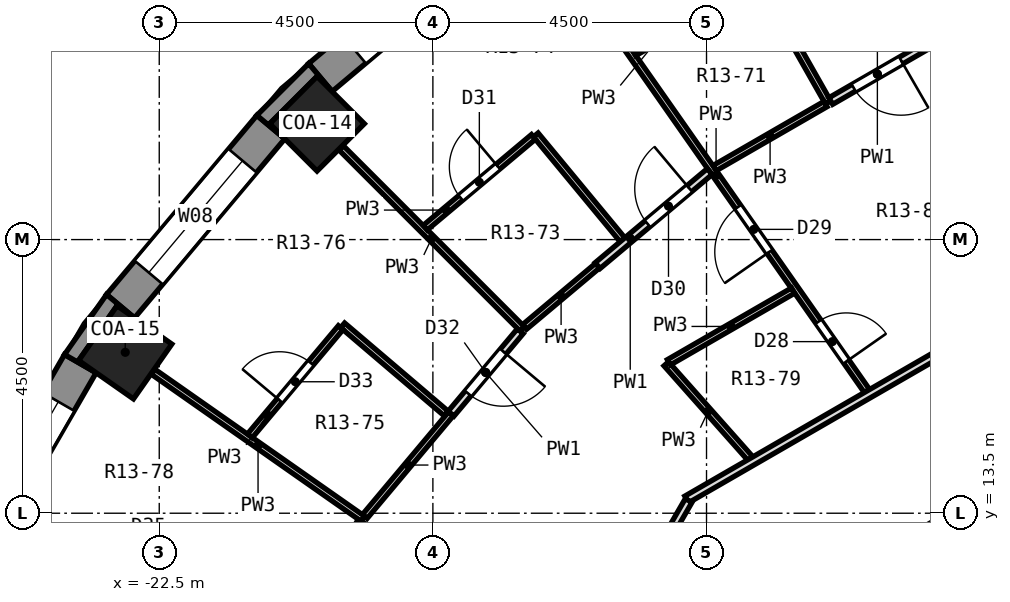
"""IFC4 building model, lengths in metres.
Left out: names, types, materials, properties, quantities, classifications, styles, units other than length and angle.
Written with IfcOpenShell. Run it as: python <this file> out.ifc"""

import sys

from ifc_helpers import new_model, si_unit, direction, frame, frame_2d, origin, origin_2d, place, context, subcontext, project, spatial, polyline, rectangle, outline, extrude, element, fill, save


model = new_model("IFC4")
c1 = context("Model", 3, precision=1e-05, world=origin(), true_north=direction((0.0, 1.0)))
c2 = subcontext(c1, "Body", "Model", "MODEL_VIEW")
j1 = project(units=[si_unit("LENGTHUNIT", "METRE"), si_unit("PLANEANGLEUNIT", "RADIAN")], contexts=[c1])
p1 = place(None, origin())
s1 = spatial("IfcSite", under=j1, at=p1, CompositionType="ELEMENT")
p2 = place(p1, origin())
s2 = spatial("IfcBuilding", under=s1, at=p2, CompositionType="ELEMENT")
p3 = place(p2, frame((0.0, 0.0, 65.9)))
s3 = spatial("IfcBuildingStorey", under=s2, at=p3, CompositionType="ELEMENT", Elevation=65.9)
for number, where, z_axis, x_axis in (
    (1, (-19.905, 19.905, 0.0), (0.0, 0.0, 1.0), (-0.707, 0.707, 0.0)),
    (2, (-23.059, 16.146, 0.0), (0.0, 0.0, 1.0), (-0.819, 0.574, 0.0)),
):
    element("IfcColumn", number, at=place(p3, frame(where, z_axis=z_axis, x_axis=x_axis)), inside=s3, PredefinedType="COLUMN", context=c2, shape_type="SweptSolid", body=[
        extrude(rectangle(XDim=1.1, YDim=1.1, at=origin_2d()), origin(), (0.0, 0.0, 1.0), 3.3),
    ])
p4 = place(p3, frame((-16.904, 23.137, 0.0), z_axis=(0.0, 0.0, 1.0), x_axis=(-0.766026164483, -0.642809392687, 0.0)))
e3 = element("IfcWall", 3, at=p4, inside=s3, PredefinedType="SOLIDWALL", context=c2, shape_type="SweptSolid", body=[
    extrude(rectangle(XDim=3.846, YDim=0.6, at=frame_2d((1.923, 0.0))), origin(), (0.0, 0.0, 1.0), 2.75),
])
p5 = place(p4, frame((0.723, 0.0, 0.9)))
e4 = element("IfcOpeningElement", 4, at=p5, cuts=e3, PredefinedType="OPENING", context=c2, shape_type="SweptSolid", body=[
    extrude(rectangle(XDim=2.4, YDim=1.8, at=frame_2d((1.2, 0.9))), frame((0.0, 0.312, 0.0), z_axis=(0.0, -1.0, 0.0), x_axis=(1.0, 0.0, 0.0)), (0.0, 0.0, 1.0), 0.624),
])
p6 = place(p3, frame((-20.665, 19.85, 0.0), z_axis=(0.0, 0.0, 1.0), x_axis=(-0.642809392687, -0.766026164483, 0.0)))
e5 = element("IfcWall", 5, at=p6, inside=s3, PredefinedType="SOLIDWALL", context=c2, shape_type="SweptSolid", body=[
    extrude(rectangle(XDim=3.846, YDim=0.6, at=frame_2d((1.923, 0.0))), origin(), (0.0, 0.0, 1.0), 2.75),
])
p7 = place(p6, frame((0.723, 0.0, 0.9)))
e6 = element("IfcOpeningElement", 6, at=p7, cuts=e5, PredefinedType="OPENING", context=c2, shape_type="SweptSolid", body=[
    extrude(rectangle(XDim=2.4, YDim=1.8, at=frame_2d((1.2, 0.9))), frame((0.0, 0.312, 0.0), z_axis=(0.0, -1.0, 0.0), x_axis=(1.0, 0.0, 0.0)), (0.0, 0.0, 1.0), 0.624),
])
p8 = place(p3, frame((-23.798, 15.96, 0.0), z_axis=(0.0, 0.0, 1.0), x_axis=(-0.499989888488, -0.86603124159, 0.0)))
e7 = element("IfcWall", 7, at=p8, inside=s3, PredefinedType="SOLIDWALL", context=c2, shape_type="SweptSolid", body=[
    extrude(rectangle(XDim=3.846, YDim=0.6, at=frame_2d((1.923, 0.0))), origin(), (0.0, 0.0, 1.0), 2.75),
])
p9 = place(p8, frame((0.723, 0.0, 0.9)))
e8 = element("IfcOpeningElement", 8, at=p9, cuts=e7, PredefinedType="OPENING", context=c2, shape_type="SweptSolid", body=[
    extrude(rectangle(XDim=2.4, YDim=1.8, at=frame_2d((1.2, 0.9))), frame((0.0, 0.312, 0.0), z_axis=(0.0, -1.0, 0.0), x_axis=(1.0, 0.0, 0.0)), (0.0, 0.0, 1.0), 0.624),
])
p10 = place(p3, origin())
e9 = element("IfcWall", 9, at=p10, inside=s3, PredefinedType="SOLIDWALL", context=c2, shape_type="SweptSolid", body=[
    extrude(outline(polyline([(-20.895, 20.043), (-20.435, 19.657), (-20.683, 19.905), (-19.905, 20.683), (-19.657, 20.435), (-20.043, 20.895), (-20.895, 20.043)])), origin(), (0.0, 0.0, 1.0), 2.75),
])
p11 = place(p3, origin())
e10 = element("IfcWall", 10, at=p11, inside=s3, PredefinedType="SOLIDWALL", context=c2, shape_type="SweptSolid", body=[
    extrude(outline(polyline([(-23.367, 17.097), (-24.058, 16.11), (-23.538, 15.81), (-23.825, 16.011), (-23.194, 16.912), (-22.907, 16.711), (-23.367, 17.097)])), origin(), (0.0, 0.0, 1.0), 2.75),
])
p12 = place(p3, frame((-12.635, 22.253, 0.0), z_axis=(0.0, 0.0, 1.0), x_axis=(0.493564284385, -0.869709317634, 0.0)))
e11 = element("IfcWall", 11, at=p12, inside=s3, PredefinedType="PARTITIONING", context=c2, shape_type="SweptSolid", body=[
    extrude(rectangle(XDim=2.3, YDim=0.1, at=frame_2d((1.15, 0.0))), origin(), (0.0, 0.0, 1.0), 2.75),
])
p13 = place(p3, frame((-15.825, 22.601, 0.0), z_axis=(0.0, 0.0, 1.0), x_axis=(0.57339608395, -0.819278298816, 0.0)))
e12 = element("IfcWall", 12, at=p13, inside=s3, PredefinedType="PARTITIONING", context=c2, shape_type="SweptSolid", body=[
    extrude(rectangle(XDim=8.655, YDim=0.1, at=frame_2d((4.328, 0.0))), origin(), (0.0, 0.0, 1.0), 2.75),
])
p14 = place(p13, frame((7.264, 0.0, 0.0)))
e13 = element("IfcOpeningElement", 13, at=p14, cuts=e12, PredefinedType="OPENING", context=c2, shape_type="SweptSolid", body=[
    extrude(rectangle(XDim=0.8, YDim=2.1, at=frame_2d((0.4, 1.05))), frame((0.0, 0.062, 0.0), z_axis=(0.0, -1.0, 0.0), x_axis=(1.0, 0.0, 0.0)), (0.0, 0.0, 1.0), 0.124),
])
p15 = place(p13, frame((4.96, 0.0, 0.0)))
e14 = element("IfcOpeningElement", 14, at=p15, cuts=e12, PredefinedType="OPENING", context=c2, shape_type="SweptSolid", body=[
    extrude(rectangle(XDim=0.9, YDim=2.1, at=frame_2d((0.45, 1.05))), frame((0.0, 0.062, 0.0), z_axis=(0.0, -1.0, 0.0), x_axis=(1.0, 0.0, 0.0)), (0.0, 0.0, 1.0), 0.124),
])
p16 = place(p3, frame((-16.308, 19.721, 0.0), z_axis=(0.0, 0.0, 1.0), x_axis=(0.637464982276, -0.770479328971, 0.0)))
e15 = element("IfcWall", 15, at=p16, inside=s3, PredefinedType="PARTITIONING", context=c2, shape_type="SweptSolid", body=[
    extrude(rectangle(XDim=2.237, YDim=0.1, at=frame_2d((1.119, 0.0))), origin(), (0.0, 0.0, 1.0), 2.75),
])
p17 = place(p3, frame((-14.162, 15.957, 0.0), z_axis=(0.0, 0.0, 1.0), x_axis=(0.663919519931, -0.747804032521, 0.0)))
e16 = element("IfcWall", 16, at=p17, inside=s3, PredefinedType="PARTITIONING", context=c2, shape_type="SweptSolid", body=[
    extrude(rectangle(XDim=2.081, YDim=0.1, at=frame_2d((1.041, 0.0))), origin(), (0.0, 0.0, 1.0), 2.75),
])
p18 = place(p3, frame((-19.509, 19.509, 0.0), z_axis=(0.0, 0.0, 1.0), x_axis=(0.707106781187, -0.707106781187, 0.0)))
e17 = element("IfcWall", 17, at=p18, inside=s3, PredefinedType="PARTITIONING", context=c2, shape_type="SweptSolid", body=[
    extrude(rectangle(XDim=4.212, YDim=0.1, at=frame_2d((2.106, 0.0))), origin(), (0.0, 0.0, 1.0), 2.75),
])
p19 = place(p3, frame((-19.484, 16.59, 0.0), z_axis=(0.0, 0.0, 1.0), x_axis=(0.761325032224, -0.648370415201, 0.0)))
e18 = element("IfcWall", 18, at=p19, inside=s3, PredefinedType="PARTITIONING", context=c2, shape_type="SweptSolid", body=[
    extrude(rectangle(XDim=2.237, YDim=0.1, at=frame_2d((1.119, 0.0))), origin(), (0.0, 0.0, 1.0), 2.75),
])
p20 = place(p3, frame((-22.6, 15.826, 0.0), z_axis=(0.0, 0.0, 1.0), x_axis=(0.818956755678, -0.573855236388, 0.0)))
e19 = element("IfcWall", 19, at=p20, inside=s3, PredefinedType="PARTITIONING", context=c2, shape_type="SweptSolid", body=[
    extrude(rectangle(XDim=4.211, YDim=0.1, at=frame_2d((2.106, 0.0))), origin(), (0.0, 0.0, 1.0), 2.75),
])
p21 = place(p3, frame((-11.952, 12.037, 0.0), z_axis=(0.0, 0.0, 1.0), x_axis=(0.866072505035, 0.499918409365, 0.0)))
e20 = element("IfcWall", 20, at=p21, inside=s3, PredefinedType="PARTITIONING", context=c2, shape_type="SweptSolid", body=[
    extrude(rectangle(XDim=8.664, YDim=0.125, at=frame_2d((4.332, 0.0))), origin(), (0.0, 0.0, 1.0), 2.75),
])
p22 = place(p21, frame((3.832, 0.0, 0.0)))
e21 = element("IfcOpeningElement", 21, at=p22, cuts=e20, PredefinedType="OPENING", context=c2, shape_type="SweptSolid", body=[
    extrude(rectangle(XDim=1.0, YDim=2.1, at=frame_2d((0.5, 1.05))), frame((0.0, 0.074, 0.0), z_axis=(0.0, -1.0, 0.0), x_axis=(1.0, 0.0, 0.0)), (0.0, 0.0, 1.0), 0.149),
])
p23 = place(p3, frame((-13.825, 13.727, 0.0), z_axis=(0.0, 0.0, 1.0), x_axis=(0.866059817553, 0.499940388867, 0.0)))
e22 = element("IfcWall", 22, at=p23, inside=s3, PredefinedType="PARTITIONING", context=c2, shape_type="SweptSolid", body=[
    extrude(rectangle(XDim=10.085, YDim=0.125, at=frame_2d((5.042, 0.0))), origin(), (0.0, 0.0, 1.0), 2.75),
])
p24 = place(p23, frame((6.306, 0.0, 0.0)))
e23 = element("IfcOpeningElement", 23, at=p24, cuts=e22, PredefinedType="OPENING", context=c2, shape_type="SweptSolid", body=[
    extrude(rectangle(XDim=1.0, YDim=2.1, at=frame_2d((0.5, 1.05))), frame((0.0, 0.074, 0.0), z_axis=(0.0, -1.0, 0.0), x_axis=(1.0, 0.0, 0.0)), (0.0, 0.0, 1.0), 0.149),
])
p25 = place(p3, frame((-14.119, 15.982, 0.0), z_axis=(0.0, 0.0, 1.0), x_axis=(0.865945816379, 0.5001378241, 0.0)))
e24 = element("IfcWall", 24, at=p25, inside=s3, PredefinedType="PARTITIONING", context=c2, shape_type="SweptSolid", body=[
    extrude(rectangle(XDim=2.357, YDim=0.1, at=frame_2d((1.179, 0.0))), origin(), (0.0, 0.0, 1.0), 2.75),
])
p26 = place(p3, frame((-13.366, 19.176, 0.0), z_axis=(0.0, 0.0, 1.0), x_axis=(0.866071606143, 0.499919966627, 0.0)))
e25 = element("IfcWall", 25, at=p26, inside=s3, PredefinedType="PARTITIONING", context=c2, shape_type="SweptSolid", body=[
    extrude(rectangle(XDim=2.104, YDim=0.1, at=frame_2d((1.052, 0.0))), origin(), (0.0, 0.0, 1.0), 2.75),
])
p27 = place(p3, frame((-11.457, 20.278, 0.0), z_axis=(0.0, 0.0, 1.0), x_axis=(0.86610522661, 0.499861717316, 0.0)))
e26 = element("IfcWall", 26, at=p27, inside=s3, PredefinedType="PARTITIONING", context=c2, shape_type="SweptSolid", body=[
    extrude(rectangle(XDim=1.771, YDim=0.125, at=frame_2d((0.885, 0.0))), origin(), (0.0, 0.0, 1.0), 2.75),
])
p28 = place(p27, frame((0.435, 0.0, 0.0)))
e27 = element("IfcOpeningElement", 27, at=p28, cuts=e26, PredefinedType="OPENING", context=c2, shape_type="SweptSolid", body=[
    extrude(rectangle(XDim=0.9, YDim=2.1, at=frame_2d((0.45, 1.05))), frame((0.0, 0.074, 0.0), z_axis=(0.0, -1.0, 0.0), x_axis=(1.0, 0.0, 0.0)), (0.0, 0.0, 1.0), 0.149),
])
p29 = place(p3, frame((-14.691, 21.067, 0.0), z_axis=(0.0, 0.0, 1.0), x_axis=(0.866166342301, 0.499755807835, 0.0)))
e28 = element("IfcWall", 28, at=p29, inside=s3, PredefinedType="PARTITIONING", context=c2, shape_type="SweptSolid", body=[
    extrude(rectangle(XDim=2.323, YDim=0.1, at=frame_2d((1.162, 0.0))), origin(), (0.0, 0.0, 1.0), 2.75),
])
p30 = place(p29, frame((0.762, 0.0, 0.0)))
e29 = element("IfcOpeningElement", 29, at=p30, cuts=e28, PredefinedType="OPENING", context=c2, shape_type="SweptSolid", body=[
    extrude(rectangle(XDim=0.8, YDim=2.1, at=frame_2d((0.4, 1.05))), frame((0.0, 0.062, 0.0), z_axis=(0.0, -1.0, 0.0), x_axis=(1.0, 0.0, 0.0)), (0.0, 0.0, 1.0), 0.124),
])
p31 = place(p3, frame((-16.493, 16.563, 0.0), z_axis=(0.0, 0.0, 1.0), x_axis=(0.765882590802, 0.642980448463, 0.0)))
e30 = element("IfcWall", 30, at=p31, inside=s3, PredefinedType="PARTITIONING", context=c2, shape_type="SweptSolid", body=[
    extrude(rectangle(XDim=1.569, YDim=0.1, at=frame_2d((0.785, 0.0))), origin(), (0.0, 0.0, 1.0), 2.75),
])
p32 = place(p3, frame((-15.291, 17.572, 0.0), z_axis=(0.0, 0.0, 1.0), x_axis=(0.766188320354, 0.642616104492, 0.0)))
e31 = element("IfcWall", 31, at=p32, inside=s3, PredefinedType="PARTITIONING", context=c2, shape_type="SweptSolid", body=[
    extrude(rectangle(XDim=2.406, YDim=0.125, at=frame_2d((1.203, 0.0))), origin(), (0.0, 0.0, 1.0), 2.75),
])
p33 = place(p32, frame((1.071, 0.0, 0.0)))
e32 = element("IfcOpeningElement", 32, at=p33, cuts=e31, PredefinedType="OPENING", context=c2, shape_type="SweptSolid", body=[
    extrude(rectangle(XDim=0.9, YDim=2.1, at=frame_2d((0.45, 1.05))), frame((0.0, 0.074, 0.0), z_axis=(0.0, -1.0, 0.0), x_axis=(1.0, 0.0, 0.0)), (0.0, 0.0, 1.0), 0.149),
])
p34 = place(p3, frame((-18.126, 18.196, 0.0), z_axis=(0.0, 0.0, 1.0), x_axis=(0.766106399864, 0.642713765286, 0.0)))
e33 = element("IfcWall", 33, at=p34, inside=s3, PredefinedType="PARTITIONING", context=c2, shape_type="SweptSolid", body=[
    extrude(rectangle(XDim=2.323, YDim=0.1, at=frame_2d((1.161, 0.0))), origin(), (0.0, 0.0, 1.0), 2.75),
])
p35 = place(p34, frame((0.761, 0.0, 0.0)))
e34 = element("IfcOpeningElement", 34, at=p35, cuts=e33, PredefinedType="OPENING", context=c2, shape_type="SweptSolid", body=[
    extrude(rectangle(XDim=0.8, YDim=2.1, at=frame_2d((0.4, 1.05))), frame((0.0, 0.062, 0.0), z_axis=(0.0, -1.0, 0.0), x_axis=(1.0, 0.0, 0.0)), (0.0, 0.0, 1.0), 0.124),
])
p36 = place(p3, frame((-19.119, 13.447, 0.0), z_axis=(0.0, 0.0, 1.0), x_axis=(0.642771526397, 0.766057938313, 0.0)))
e35 = element("IfcWall", 35, at=p36, inside=s3, PredefinedType="PARTITIONING", context=c2, shape_type="SweptSolid", body=[
    extrude(rectangle(XDim=2.206, YDim=0.1, at=frame_2d((1.103, 0.0))), origin(), (0.0, 0.0, 1.0), 2.75),
])
p37 = place(p3, frame((-17.701, 15.137, 0.0), z_axis=(0.0, 0.0, 1.0), x_axis=(0.642894375175, 0.765954843557, 0.0)))
e36 = element("IfcWall", 36, at=p37, inside=s3, PredefinedType="PARTITIONING", context=c2, shape_type="SweptSolid", body=[
    extrude(rectangle(XDim=1.77, YDim=0.125, at=frame_2d((0.885, 0.0))), origin(), (0.0, 0.0, 1.0), 2.75),
])
p38 = place(p37, frame((0.435, 0.0, 0.0)))
e37 = element("IfcOpeningElement", 37, at=p38, cuts=e36, PredefinedType="OPENING", context=c2, shape_type="SweptSolid", body=[
    extrude(rectangle(XDim=0.9, YDim=2.1, at=frame_2d((0.45, 1.05))), frame((0.0, 0.074, 0.0), z_axis=(0.0, -1.0, 0.0), x_axis=(1.0, 0.0, 0.0)), (0.0, 0.0, 1.0), 0.149),
])
p39 = place(p3, frame((-21.01, 14.772, 0.0), z_axis=(0.0, 0.0, 1.0), x_axis=(0.642898772456, 0.765951152734, 0.0)))
e38 = element("IfcWall", 38, at=p39, inside=s3, PredefinedType="PARTITIONING", context=c2, shape_type="SweptSolid", body=[
    extrude(rectangle(XDim=2.323, YDim=0.1, at=frame_2d((1.162, 0.0))), origin(), (0.0, 0.0, 1.0), 2.75),
])
p40 = place(p39, frame((0.762, 0.0, 0.0)))
e39 = element("IfcOpeningElement", 39, at=p40, cuts=e38, PredefinedType="OPENING", context=c2, shape_type="SweptSolid", body=[
    extrude(rectangle(XDim=0.8, YDim=2.1, at=frame_2d((0.4, 1.05))), frame((0.0, 0.062, 0.0), z_axis=(0.0, -1.0, 0.0), x_axis=(1.0, 0.0, 0.0)), (0.0, 0.0, 1.0), 0.124),
])
p41 = place(p3, frame((-15.758, 10.307, 0.0), z_axis=(0.0, 0.0, 1.0), x_axis=(0.499916150712, 0.866073808781, 0.0)))
e40 = element("IfcWall", 40, at=p41, inside=s3, PredefinedType="PARTITIONING", context=c2, shape_type="SweptSolid", body=[
    extrude(rectangle(XDim=3.928, YDim=0.125, at=frame_2d((1.964, 0.0))), origin(), (0.0, 0.0, 1.0), 2.75),
])
p42 = place(p3, frame((-20.646, 10.818, 0.0), z_axis=(0.0, 0.0, 1.0), x_axis=(0.500129612544, 0.865950559014, 0.0)))
e41 = element("IfcWall", 41, at=p42, inside=s3, PredefinedType="PARTITIONING", context=c2, shape_type="SweptSolid", body=[
    extrude(rectangle(XDim=2.941, YDim=0.125, at=frame_2d((1.471, 0.0))), origin(), (0.0, 0.0, 1.0), 2.75),
])
p43 = place(p42, frame((1.606, 0.0, 0.0)))
e42 = element("IfcOpeningElement", 42, at=p43, cuts=e41, PredefinedType="OPENING", context=c2, shape_type="SweptSolid", body=[
    extrude(rectangle(XDim=0.9, YDim=2.1, at=frame_2d((0.45, 1.05))), frame((0.0, 0.074, 0.0), z_axis=(0.0, -1.0, 0.0), x_axis=(1.0, 0.0, 0.0)), (0.0, 0.0, 1.0), 0.149),
])
p44 = place(p5, origin())
e43 = element("IfcWindow", 43, at=p44, inside=s3, PartitioningType="SINGLE_PANEL", PredefinedType="WINDOW", context=c2, shape_type="SweptSolid", body=[
    extrude(rectangle(XDim=2.4, YDim=1.8, at=frame_2d((1.2, 0.9))), frame((0.0, 0.18, 0.0), z_axis=(0.0, -1.0, 0.0), x_axis=(1.0, 0.0, 0.0)), (0.0, 0.0, 1.0), 0.06),
])
fill(e4, e43)
p45 = place(p7, origin())
e44 = element("IfcWindow", 44, at=p45, inside=s3, PartitioningType="SINGLE_PANEL", PredefinedType="WINDOW", context=c2, shape_type="SweptSolid", body=[
    extrude(rectangle(XDim=2.4, YDim=1.8, at=frame_2d((1.2, 0.9))), frame((0.0, 0.18, 0.0), z_axis=(0.0, -1.0, 0.0), x_axis=(1.0, 0.0, 0.0)), (0.0, 0.0, 1.0), 0.06),
])
fill(e6, e44)
p46 = place(p9, origin())
e45 = element("IfcWindow", 45, at=p46, inside=s3, PartitioningType="SINGLE_PANEL", PredefinedType="WINDOW", context=c2, shape_type="SweptSolid", body=[
    extrude(rectangle(XDim=2.4, YDim=1.8, at=frame_2d((1.2, 0.9))), frame((0.0, 0.18, 0.0), z_axis=(0.0, -1.0, 0.0), x_axis=(1.0, 0.0, 0.0)), (0.0, 0.0, 1.0), 0.06),
])
fill(e8, e45)
p47 = place(p28, frame((0.9, 0.0, 0.0), z_axis=(0.0, 0.0, 1.0), x_axis=(-1.0, 0.0, 0.0)))
e46 = element("IfcDoor", 46, at=p47, inside=s3, OperationType="SINGLE_SWING_LEFT", PredefinedType="DOOR", context=c2, shape_type="SweptSolid", body=[
    extrude(rectangle(XDim=0.9, YDim=2.1, at=frame_2d((0.45, 1.05))), frame((0.0, 0.025, 0.0), z_axis=(0.0, -1.0, 0.0), x_axis=(1.0, 0.0, 0.0)), (0.0, 0.0, 1.0), 0.05),
])
fill(e27, e46)
p48 = place(p14, origin())
e47 = element("IfcDoor", 47, at=p48, inside=s3, OperationType="SINGLE_SWING_RIGHT", PredefinedType="DOOR", context=c2, shape_type="SweptSolid", body=[
    extrude(rectangle(XDim=0.8, YDim=2.1, at=frame_2d((0.4, 1.05))), frame((0.0, 0.025, 0.0), z_axis=(0.0, -1.0, 0.0), x_axis=(1.0, 0.0, 0.0)), (0.0, 0.0, 1.0), 0.05),
])
fill(e13, e47)
p49 = place(p15, frame((0.9, 0.0, 0.0), z_axis=(0.0, 0.0, 1.0), x_axis=(-1.0, 0.0, 0.0)))
e48 = element("IfcDoor", 48, at=p49, inside=s3, OperationType="SINGLE_SWING_LEFT", PredefinedType="DOOR", context=c2, shape_type="SweptSolid", body=[
    extrude(rectangle(XDim=0.9, YDim=2.1, at=frame_2d((0.45, 1.05))), frame((0.0, 0.025, 0.0), z_axis=(0.0, -1.0, 0.0), x_axis=(1.0, 0.0, 0.0)), (0.0, 0.0, 1.0), 0.05),
])
fill(e14, e48)
p50 = place(p33, origin())
e49 = element("IfcDoor", 49, at=p50, inside=s3, OperationType="SINGLE_SWING_RIGHT", PredefinedType="DOOR", context=c2, shape_type="SweptSolid", body=[
    extrude(rectangle(XDim=0.9, YDim=2.1, at=frame_2d((0.45, 1.05))), frame((0.0, 0.025, 0.0), z_axis=(0.0, -1.0, 0.0), x_axis=(1.0, 0.0, 0.0)), (0.0, 0.0, 1.0), 0.05),
])
fill(e32, e49)
p51 = place(p35, origin())
e50 = element("IfcDoor", 50, at=p51, inside=s3, OperationType="SINGLE_SWING_RIGHT", PredefinedType="DOOR", context=c2, shape_type="SweptSolid", body=[
    extrude(rectangle(XDim=0.8, YDim=2.1, at=frame_2d((0.4, 1.05))), frame((0.0, 0.025, 0.0), z_axis=(0.0, -1.0, 0.0), x_axis=(1.0, 0.0, 0.0)), (0.0, 0.0, 1.0), 0.05),
])
fill(e34, e50)
p52 = place(p38, frame((0.9, 0.0, 0.0), z_axis=(0.0, 0.0, 1.0), x_axis=(-1.0, 0.0, 0.0)))
e51 = element("IfcDoor", 51, at=p52, inside=s3, OperationType="SINGLE_SWING_LEFT", PredefinedType="DOOR", context=c2, shape_type="SweptSolid", body=[
    extrude(rectangle(XDim=0.9, YDim=2.1, at=frame_2d((0.45, 1.05))), frame((0.0, 0.025, 0.0), z_axis=(0.0, -1.0, 0.0), x_axis=(1.0, 0.0, 0.0)), (0.0, 0.0, 1.0), 0.05),
])
fill(e37, e51)
p53 = place(p40, origin())
e52 = element("IfcDoor", 52, at=p53, inside=s3, OperationType="SINGLE_SWING_LEFT", PredefinedType="DOOR", context=c2, shape_type="SweptSolid", body=[
    extrude(rectangle(XDim=0.8, YDim=2.1, at=frame_2d((0.4, 1.05))), frame((0.0, 0.025, 0.0), z_axis=(0.0, -1.0, 0.0), x_axis=(1.0, 0.0, 0.0)), (0.0, 0.0, 1.0), 0.05),
])
fill(e39, e52)
save(model, sys.argv[1])
